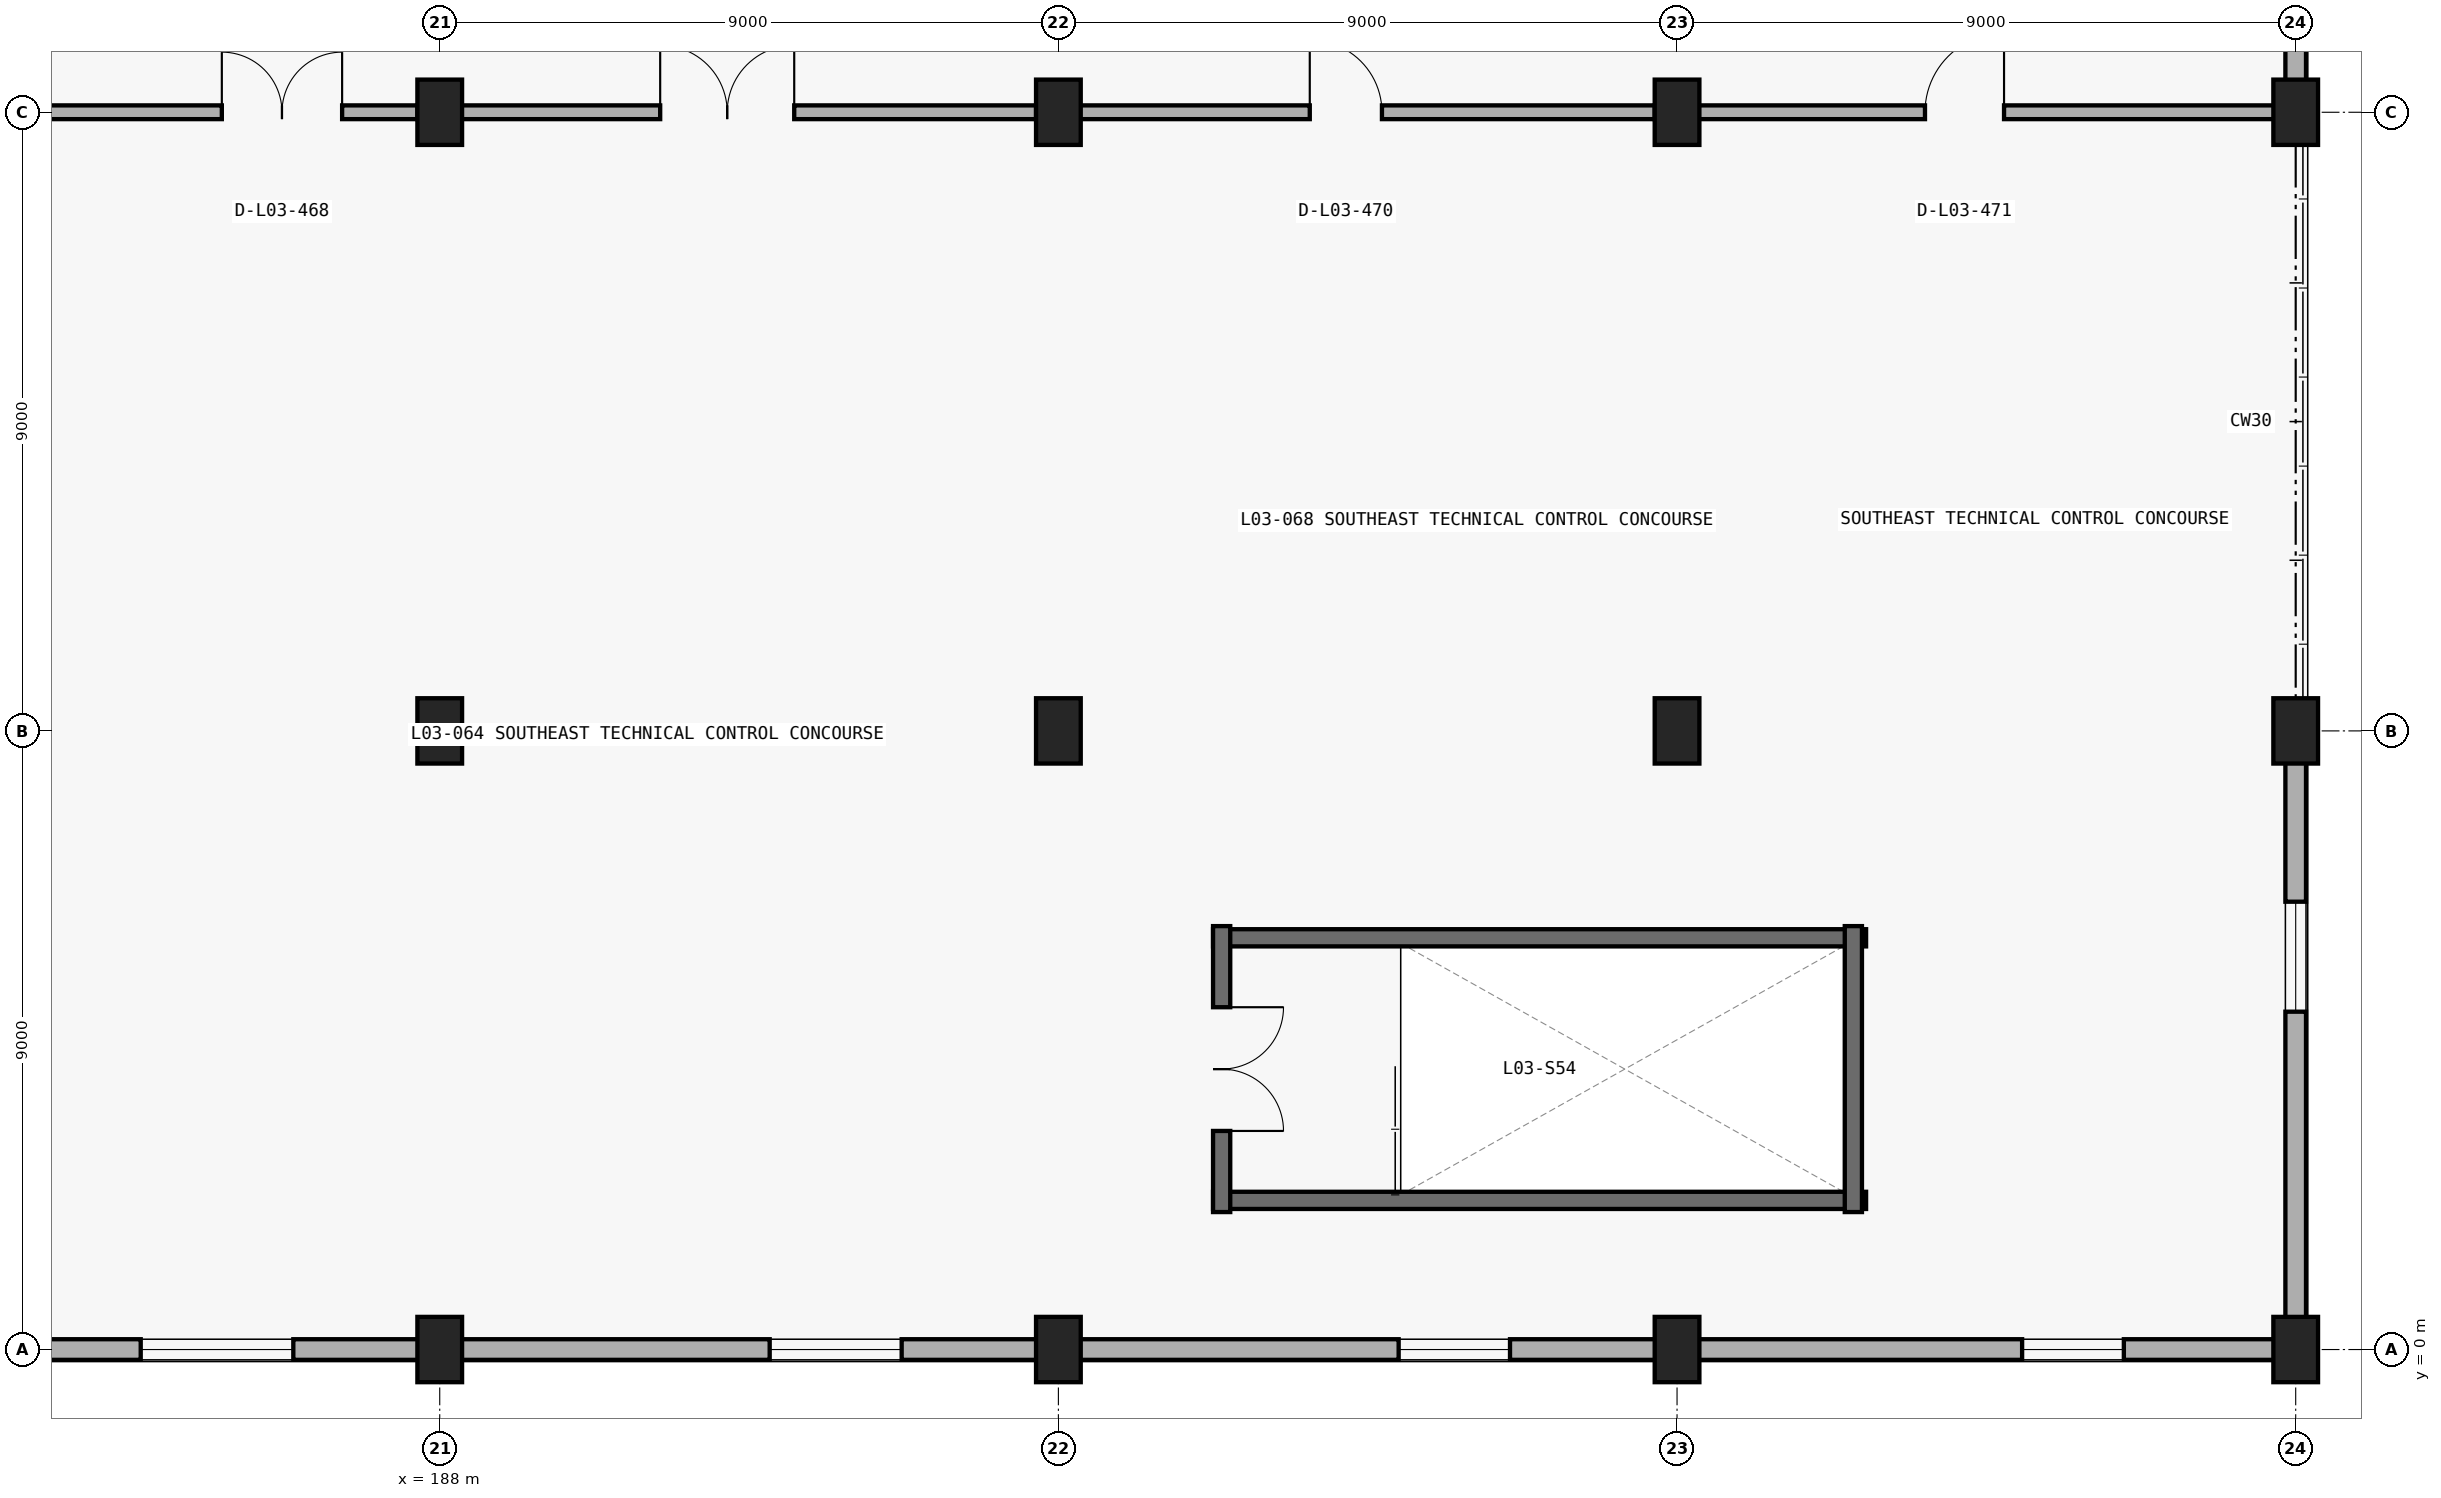
"""IFC4 building model, lengths in metres.
Left out: names, types, materials, properties, quantities, classifications, styles, units other than length and angle.
Written with IfcOpenShell. Run it as: python <this file> out.ifc"""

import sys

from ifc_helpers import new_model, si_unit, direction, frame, frame_2d, origin, origin_2d, place, context, subcontext, project, spatial, rectangle, extrude, element, fill, save


model = new_model("IFC4")
c1 = context("Model", 3, precision=1e-05, world=origin(), true_north=direction((0.0, 1.0)))
c2 = subcontext(c1, "Body", "Model", "MODEL_VIEW")
j1 = project(units=[si_unit("LENGTHUNIT", "METRE"), si_unit("PLANEANGLEUNIT", "RADIAN")], contexts=[c1])
p1 = place(None, origin())
s1 = spatial("IfcSite", under=j1, at=p1, CompositionType="ELEMENT")
p2 = place(p1, origin())
s2 = spatial("IfcBuilding", under=s1, at=p2, CompositionType="ELEMENT")
p3 = place(p2, frame((0.0, 0.0, 15.0)))
s3 = spatial("IfcBuildingStorey", under=s2, at=p3, CompositionType="ELEMENT", Elevation=15.0)
for number, where, z_axis, x_axis in (
    (1, (188.0, 0.0, 0.0), (0.0, 0.0, 1.0), (1.0, 0.0, 0.0)),
    (2, (188.0, 9.0, 0.0), (0.0, 0.0, 1.0), (1.0, 0.0, 0.0)),
    (3, (188.0, 18.0, 0.0), (0.0, 0.0, 1.0), (1.0, 0.0, 0.0)),
    (4, (197.0, 0.0, 0.0), (0.0, 0.0, 1.0), (1.0, 0.0, 0.0)),
    (5, (197.0, 9.0, 0.0), (0.0, 0.0, 1.0), (1.0, 0.0, 0.0)),
    (6, (197.0, 18.0, 0.0), (0.0, 0.0, 1.0), (1.0, 0.0, 0.0)),
    (7, (206.0, 0.0, 0.0), (0.0, 0.0, 1.0), (1.0, 0.0, 0.0)),
    (8, (206.0, 9.0, 0.0), (0.0, 0.0, 1.0), (1.0, 0.0, 0.0)),
    (9, (206.0, 18.0, 0.0), (0.0, 0.0, 1.0), (1.0, 0.0, 0.0)),
    (10, (215.0, 0.0, 0.0), (0.0, 0.0, 1.0), (1.0, 0.0, 0.0)),
    (11, (215.0, 9.0, 0.0), (0.0, 0.0, 1.0), (1.0, 0.0, 0.0)),
    (12, (215.0, 18.0, 0.0), (0.0, 0.0, 1.0), (1.0, 0.0, 0.0)),
):
    element("IfcColumn", number, at=place(p3, frame(where, z_axis=z_axis, x_axis=x_axis)), inside=s3, PredefinedType="COLUMN", context=c2, shape_type="SweptSolid", body=[
        extrude(rectangle(XDim=0.65, YDim=0.95, at=origin_2d()), origin(), (0.0, 0.0, 1.0), 4.8),
    ])
p4 = place(p3, frame((214.7, 0.0, 0.0), z_axis=(0.0, 0.0, 1.0), x_axis=(-1.0, 0.0, 0.0)))
e13 = element("IfcWall", 13, at=p4, inside=s3, PredefinedType="STANDARD", context=c2, shape_type="SweptSolid", body=[
    extrude(rectangle(XDim=8.4, YDim=0.3, at=frame_2d((4.2, 0.0))), origin(), (0.0, 0.0, 1.0), 3.823),
])
p5 = place(p4, frame((2.2, 0.0, 0.95)))
e14 = element("IfcOpeningElement", 14, at=p5, cuts=e13, PredefinedType="OPENING", context=c2, shape_type="SweptSolid", body=[
    extrude(rectangle(XDim=1.48, YDim=2.05, at=frame_2d((0.74, 1.025))), frame((0.0, 0.16, 0.0), z_axis=(0.0, -1.0, 0.0), x_axis=(1.0, 0.0, 0.0)), (0.0, 0.0, 1.0), 0.32),
])
p6 = place(p3, frame((205.7, 0.0, 0.0), z_axis=(0.0, 0.0, 1.0), x_axis=(-1.0, 0.0, 0.0)))
e15 = element("IfcWall", 15, at=p6, inside=s3, PredefinedType="STANDARD", context=c2, shape_type="SweptSolid", body=[
    extrude(rectangle(XDim=8.4, YDim=0.3, at=frame_2d((4.2, 0.0))), origin(), (0.0, 0.0, 1.0), 3.823),
])
p7 = place(p6, frame((2.13, 0.0, 0.95)))
e16 = element("IfcOpeningElement", 16, at=p7, cuts=e15, PredefinedType="OPENING", context=c2, shape_type="SweptSolid", body=[
    extrude(rectangle(XDim=1.62, YDim=2.12, at=frame_2d((0.81, 1.06))), frame((0.0, 0.16, 0.0), z_axis=(0.0, -1.0, 0.0), x_axis=(1.0, 0.0, 0.0)), (0.0, 0.0, 1.0), 0.32),
])
p8 = place(p3, frame((196.7, 0.0, 0.0), z_axis=(0.0, 0.0, 1.0), x_axis=(-1.0, 0.0, 0.0)))
e17 = element("IfcWall", 17, at=p8, inside=s3, PredefinedType="STANDARD", context=c2, shape_type="SweptSolid", body=[
    extrude(rectangle(XDim=8.4, YDim=0.3, at=frame_2d((4.2, 0.0))), origin(), (0.0, 0.0, 1.0), 3.823),
])
p9 = place(p8, frame((1.98, 0.0, 0.95)))
e18 = element("IfcOpeningElement", 18, at=p9, cuts=e17, PredefinedType="OPENING", context=c2, shape_type="SweptSolid", body=[
    extrude(rectangle(XDim=1.92, YDim=2.18, at=frame_2d((0.96, 1.09))), frame((0.0, 0.16, 0.0), z_axis=(0.0, -1.0, 0.0), x_axis=(1.0, 0.0, 0.0)), (0.0, 0.0, 1.0), 0.32),
])
p10 = place(p3, frame((187.7, 0.0, 0.0), z_axis=(0.0, 0.0, 1.0), x_axis=(-1.0, 0.0, 0.0)))
e19 = element("IfcWall", 19, at=p10, inside=s3, PredefinedType="STANDARD", context=c2, shape_type="SweptSolid", body=[
    extrude(rectangle(XDim=8.4, YDim=0.3, at=frame_2d((4.2, 0.0))), origin(), (0.0, 0.0, 1.0), 3.823),
])
p11 = place(p10, frame((1.83, 0.0, 0.95)))
e20 = element("IfcOpeningElement", 20, at=p11, cuts=e19, PredefinedType="OPENING", context=c2, shape_type="SweptSolid", body=[
    extrude(rectangle(XDim=2.22, YDim=2.24, at=frame_2d((1.11, 1.12))), frame((0.0, 0.16, 0.0), z_axis=(0.0, -1.0, 0.0), x_axis=(1.0, 0.0, 0.0)), (0.0, 0.0, 1.0), 0.32),
])
p12 = place(p3, frame((215.0, 26.55, 0.0), z_axis=(0.0, 0.0, 1.0), x_axis=(0.0, -1.0, 0.0)))
e21 = element("IfcWall", 21, at=p12, inside=s3, PredefinedType="STANDARD", context=c2, shape_type="SweptSolid", body=[
    extrude(rectangle(XDim=8.1, YDim=0.3, at=frame_2d((4.05, 0.0))), origin(), (0.0, 0.0, 1.0), 3.857),
])
p13 = place(p12, frame((1.485, 0.0, 0.95)))
e22 = element("IfcOpeningElement", 22, at=p13, cuts=e21, PredefinedType="OPENING", context=c2, shape_type="SweptSolid", body=[
    extrude(rectangle(XDim=2.7, YDim=2.25, at=frame_2d((1.35, 1.125))), frame((0.0, 0.16, 0.0), z_axis=(0.0, -1.0, 0.0), x_axis=(1.0, 0.0, 0.0)), (0.0, 0.0, 1.0), 0.32),
])
p14 = place(p3, frame((215.0, 8.55, 0.0), z_axis=(0.0, 0.0, 1.0), x_axis=(0.0, -1.0, 0.0)))
e23 = element("IfcWall", 23, at=p14, inside=s3, PredefinedType="STANDARD", context=c2, shape_type="SweptSolid", body=[
    extrude(rectangle(XDim=8.1, YDim=0.3, at=frame_2d((4.05, 0.0))), origin(), (0.0, 0.0, 1.0), 3.857),
])
p15 = place(p14, frame((2.035, 0.0, 0.95)))
e24 = element("IfcOpeningElement", 24, at=p15, cuts=e23, PredefinedType="OPENING", context=c2, shape_type="SweptSolid", body=[
    extrude(rectangle(XDim=1.6, YDim=1.6, at=frame_2d((0.8, 0.8))), frame((0.0, 0.16, 0.0), z_axis=(0.0, -1.0, 0.0), x_axis=(1.0, 0.0, 0.0)), (0.0, 0.0, 1.0), 0.32),
])
for number, where, z_axis, x_axis in (
    (25, (199.25, 2.17, 0.0), (0.0, 0.0, 1.0), (1.0, 0.0, 0.0)),
    (26, (208.75, 5.99, 0.0), (0.0, 0.0, 1.0), (-1.0, 0.0, 0.0)),
):
    element("IfcWall", number, at=place(p3, frame(where, z_axis=z_axis, x_axis=x_axis)), inside=s3, PredefinedType="SHEAR", context=c2, shape_type="SweptSolid", body=[
        extrude(rectangle(XDim=9.5, YDim=0.25, at=frame_2d((4.75, 0.0))), origin(), (0.0, 0.0, 1.0), 4.54),
    ])
p16 = place(p3, frame((199.375, 6.16, 0.0), z_axis=(0.0, 0.0, 1.0), x_axis=(0.0, -1.0, 0.0)))
e27 = element("IfcWall", 27, at=p16, inside=s3, PredefinedType="SHEAR", context=c2, shape_type="SweptSolid", body=[
    extrude(rectangle(XDim=4.16, YDim=0.25, at=frame_2d((2.08, 0.0))), origin(), (0.0, 0.0, 1.0), 4.54),
])
p17 = place(p16, frame((1.18, 0.0, 0.0)))
e28 = element("IfcOpeningElement", 28, at=p17, cuts=e27, PredefinedType="OPENING", context=c2, shape_type="SweptSolid", body=[
    extrude(rectangle(XDim=1.8, YDim=2.25, at=frame_2d((0.9, 1.125))), frame((0.0, 0.135, 0.0), z_axis=(0.0, -1.0, 0.0), x_axis=(1.0, 0.0, 0.0)), (0.0, 0.0, 1.0), 0.27),
])
p18 = place(p3, frame((208.565, 2.0, 0.0), z_axis=(0.0, 0.0, 1.0), x_axis=(0.0, 1.0, 0.0)))
e29 = element("IfcWall", 29, at=p18, inside=s3, PredefinedType="SHEAR", context=c2, shape_type="SweptSolid", body=[
    extrude(rectangle(XDim=4.16, YDim=0.25, at=frame_2d((2.08, 0.0))), origin(), (0.0, 0.0, 1.0), 4.54),
])
p19 = place(p3, frame((178.675, 18.0, 0.0), z_axis=(0.0, 0.0, 1.0), x_axis=(1.0, 0.0, 0.0)))
e30 = element("IfcWall", 30, at=p19, inside=s3, PredefinedType="PARTITIONING", context=c2, shape_type="SweptSolid", body=[
    extrude(rectangle(XDim=9.015, YDim=0.2, at=frame_2d((4.507, 0.0))), origin(), (0.0, 0.0, 1.0), 3.823),
])
p20 = place(p19, frame((6.155, 0.0, 0.0)))
e31 = element("IfcOpeningElement", 31, at=p20, cuts=e30, PredefinedType="OPENING", context=c2, shape_type="SweptSolid", body=[
    extrude(rectangle(XDim=1.75, YDim=2.3, at=frame_2d((0.875, 1.15))), frame((0.0, 0.11, 0.0), z_axis=(0.0, -1.0, 0.0), x_axis=(1.0, 0.0, 0.0)), (0.0, 0.0, 1.0), 0.22),
])
p21 = place(p3, frame((187.675, 18.0, 0.0), z_axis=(0.0, 0.0, 1.0), x_axis=(1.0, 0.0, 0.0)))
e32 = element("IfcWall", 32, at=p21, inside=s3, PredefinedType="PARTITIONING", context=c2, shape_type="SweptSolid", body=[
    extrude(rectangle(XDim=9.015, YDim=0.2, at=frame_2d((4.507, 0.0))), origin(), (0.0, 0.0, 1.0), 3.823),
])
p22 = place(p21, frame((3.532, 0.0, 0.0)))
e33 = element("IfcOpeningElement", 33, at=p22, cuts=e32, PredefinedType="OPENING", context=c2, shape_type="SweptSolid", body=[
    extrude(rectangle(XDim=1.95, YDim=2.35, at=frame_2d((0.975, 1.175))), frame((0.0, 0.11, 0.0), z_axis=(0.0, -1.0, 0.0), x_axis=(1.0, 0.0, 0.0)), (0.0, 0.0, 1.0), 0.22),
])
p23 = place(p3, frame((196.675, 18.0, 0.0), z_axis=(0.0, 0.0, 1.0), x_axis=(1.0, 0.0, 0.0)))
e34 = element("IfcWall", 34, at=p23, inside=s3, PredefinedType="PARTITIONING", context=c2, shape_type="SweptSolid", body=[
    extrude(rectangle(XDim=9.015, YDim=0.2, at=frame_2d((4.507, 0.0))), origin(), (0.0, 0.0, 1.0), 3.823),
])
p24 = place(p23, frame((3.982, 0.0, 0.0)))
e35 = element("IfcOpeningElement", 35, at=p24, cuts=e34, PredefinedType="OPENING", context=c2, shape_type="SweptSolid", body=[
    extrude(rectangle(XDim=1.05, YDim=2.15, at=frame_2d((0.525, 1.075))), frame((0.0, 0.11, 0.0), z_axis=(0.0, -1.0, 0.0), x_axis=(1.0, 0.0, 0.0)), (0.0, 0.0, 1.0), 0.22),
])
p25 = place(p3, frame((205.675, 18.0, 0.0), z_axis=(0.0, 0.0, 1.0), x_axis=(1.0, 0.0, 0.0)))
e36 = element("IfcWall", 36, at=p25, inside=s3, PredefinedType="PARTITIONING", context=c2, shape_type="SweptSolid", body=[
    extrude(rectangle(XDim=9.015, YDim=0.2, at=frame_2d((4.507, 0.0))), origin(), (0.0, 0.0, 1.0), 3.823),
])
p26 = place(p25, frame((3.932, 0.0, 0.0)))
e37 = element("IfcOpeningElement", 37, at=p26, cuts=e36, PredefinedType="OPENING", context=c2, shape_type="SweptSolid", body=[
    extrude(rectangle(XDim=1.15, YDim=2.2, at=frame_2d((0.575, 1.1))), frame((0.0, 0.11, 0.0), z_axis=(0.0, -1.0, 0.0), x_axis=(1.0, 0.0, 0.0)), (0.0, 0.0, 1.0), 0.22),
])
p27 = place(p5, origin())
e38 = element("IfcWindow", 38, at=p27, inside=s3, PartitioningType="SINGLE_PANEL", PredefinedType="WINDOW", context=c2, shape_type="SweptSolid", body=[
    extrude(rectangle(XDim=1.48, YDim=2.05, at=frame_2d((0.74, 1.025))), frame((0.0, 0.03, 0.0), z_axis=(0.0, -1.0, 0.0), x_axis=(1.0, 0.0, 0.0)), (0.0, 0.0, 1.0), 0.06),
])
fill(e14, e38)
p28 = place(p7, origin())
e39 = element("IfcWindow", 39, at=p28, inside=s3, PartitioningType="SINGLE_PANEL", PredefinedType="WINDOW", context=c2, shape_type="SweptSolid", body=[
    extrude(rectangle(XDim=1.62, YDim=2.12, at=frame_2d((0.81, 1.06))), frame((0.0, 0.03, 0.0), z_axis=(0.0, -1.0, 0.0), x_axis=(1.0, 0.0, 0.0)), (0.0, 0.0, 1.0), 0.06),
])
fill(e16, e39)
p29 = place(p9, origin())
e40 = element("IfcWindow", 40, at=p29, inside=s3, PartitioningType="SINGLE_PANEL", PredefinedType="WINDOW", context=c2, shape_type="SweptSolid", body=[
    extrude(rectangle(XDim=1.92, YDim=2.18, at=frame_2d((0.96, 1.09))), frame((0.0, 0.03, 0.0), z_axis=(0.0, -1.0, 0.0), x_axis=(1.0, 0.0, 0.0)), (0.0, 0.0, 1.0), 0.06),
])
fill(e18, e40)
p30 = place(p11, origin())
e41 = element("IfcWindow", 41, at=p30, inside=s3, PartitioningType="SINGLE_PANEL", PredefinedType="WINDOW", context=c2, shape_type="SweptSolid", body=[
    extrude(rectangle(XDim=2.22, YDim=2.24, at=frame_2d((1.11, 1.12))), frame((0.0, 0.03, 0.0), z_axis=(0.0, -1.0, 0.0), x_axis=(1.0, 0.0, 0.0)), (0.0, 0.0, 1.0), 0.06),
])
fill(e20, e41)
p31 = place(p15, origin())
e42 = element("IfcWindow", 42, at=p31, inside=s3, PartitioningType="SINGLE_PANEL", PredefinedType="WINDOW", context=c2, shape_type="SweptSolid", body=[
    extrude(rectangle(XDim=1.6, YDim=1.6, at=frame_2d((0.8, 0.8))), frame((0.0, 0.03, 0.0), z_axis=(0.0, -1.0, 0.0), x_axis=(1.0, 0.0, 0.0)), (0.0, 0.0, 1.0), 0.06),
])
fill(e24, e42)
p32 = place(p17, origin())
e43 = element("IfcDoor", 43, at=p32, inside=s3, OperationType="DOUBLE_DOOR_SINGLE_SWING", PredefinedType="DOOR", context=c2, shape_type="SweptSolid", body=[
    extrude(rectangle(XDim=1.8, YDim=2.25, at=frame_2d((0.9, 1.125))), frame((0.0, 0.025, 0.0), z_axis=(0.0, -1.0, 0.0), x_axis=(1.0, 0.0, 0.0)), (0.0, 0.0, 1.0), 0.05),
])
fill(e28, e43)
p33 = place(p20, origin())
e44 = element("IfcDoor", 44, at=p33, inside=s3, OperationType="DOUBLE_DOOR_SINGLE_SWING", PredefinedType="DOOR", context=c2, shape_type="SweptSolid", body=[
    extrude(rectangle(XDim=1.75, YDim=2.3, at=frame_2d((0.875, 1.15))), frame((0.0, 0.025, 0.0), z_axis=(0.0, -1.0, 0.0), x_axis=(1.0, 0.0, 0.0)), (0.0, 0.0, 1.0), 0.05),
])
fill(e31, e44)
p34 = place(p22, origin())
e45 = element("IfcDoor", 45, at=p34, inside=s3, OperationType="DOUBLE_DOOR_SINGLE_SWING", PredefinedType="DOOR", context=c2, shape_type="SweptSolid", body=[
    extrude(rectangle(XDim=1.95, YDim=2.35, at=frame_2d((0.975, 1.175))), frame((0.0, 0.025, 0.0), z_axis=(0.0, -1.0, 0.0), x_axis=(1.0, 0.0, 0.0)), (0.0, 0.0, 1.0), 0.05),
])
fill(e33, e45)
p35 = place(p24, origin())
e46 = element("IfcDoor", 46, at=p35, inside=s3, OperationType="SINGLE_SWING_LEFT", PredefinedType="DOOR", context=c2, shape_type="SweptSolid", body=[
    extrude(rectangle(XDim=1.05, YDim=2.15, at=frame_2d((0.525, 1.075))), frame((0.0, 0.025, 0.0), z_axis=(0.0, -1.0, 0.0), x_axis=(1.0, 0.0, 0.0)), (0.0, 0.0, 1.0), 0.05),
])
fill(e35, e46)
p36 = place(p26, origin())
e47 = element("IfcDoor", 47, at=p36, inside=s3, OperationType="SINGLE_SWING_RIGHT", PredefinedType="DOOR", context=c2, shape_type="SweptSolid", body=[
    extrude(rectangle(XDim=1.15, YDim=2.2, at=frame_2d((0.575, 1.1))), frame((0.0, 0.025, 0.0), z_axis=(0.0, -1.0, 0.0), x_axis=(1.0, 0.0, 0.0)), (0.0, 0.0, 1.0), 0.05),
])
fill(e37, e47)
save(model, sys.argv[1])
